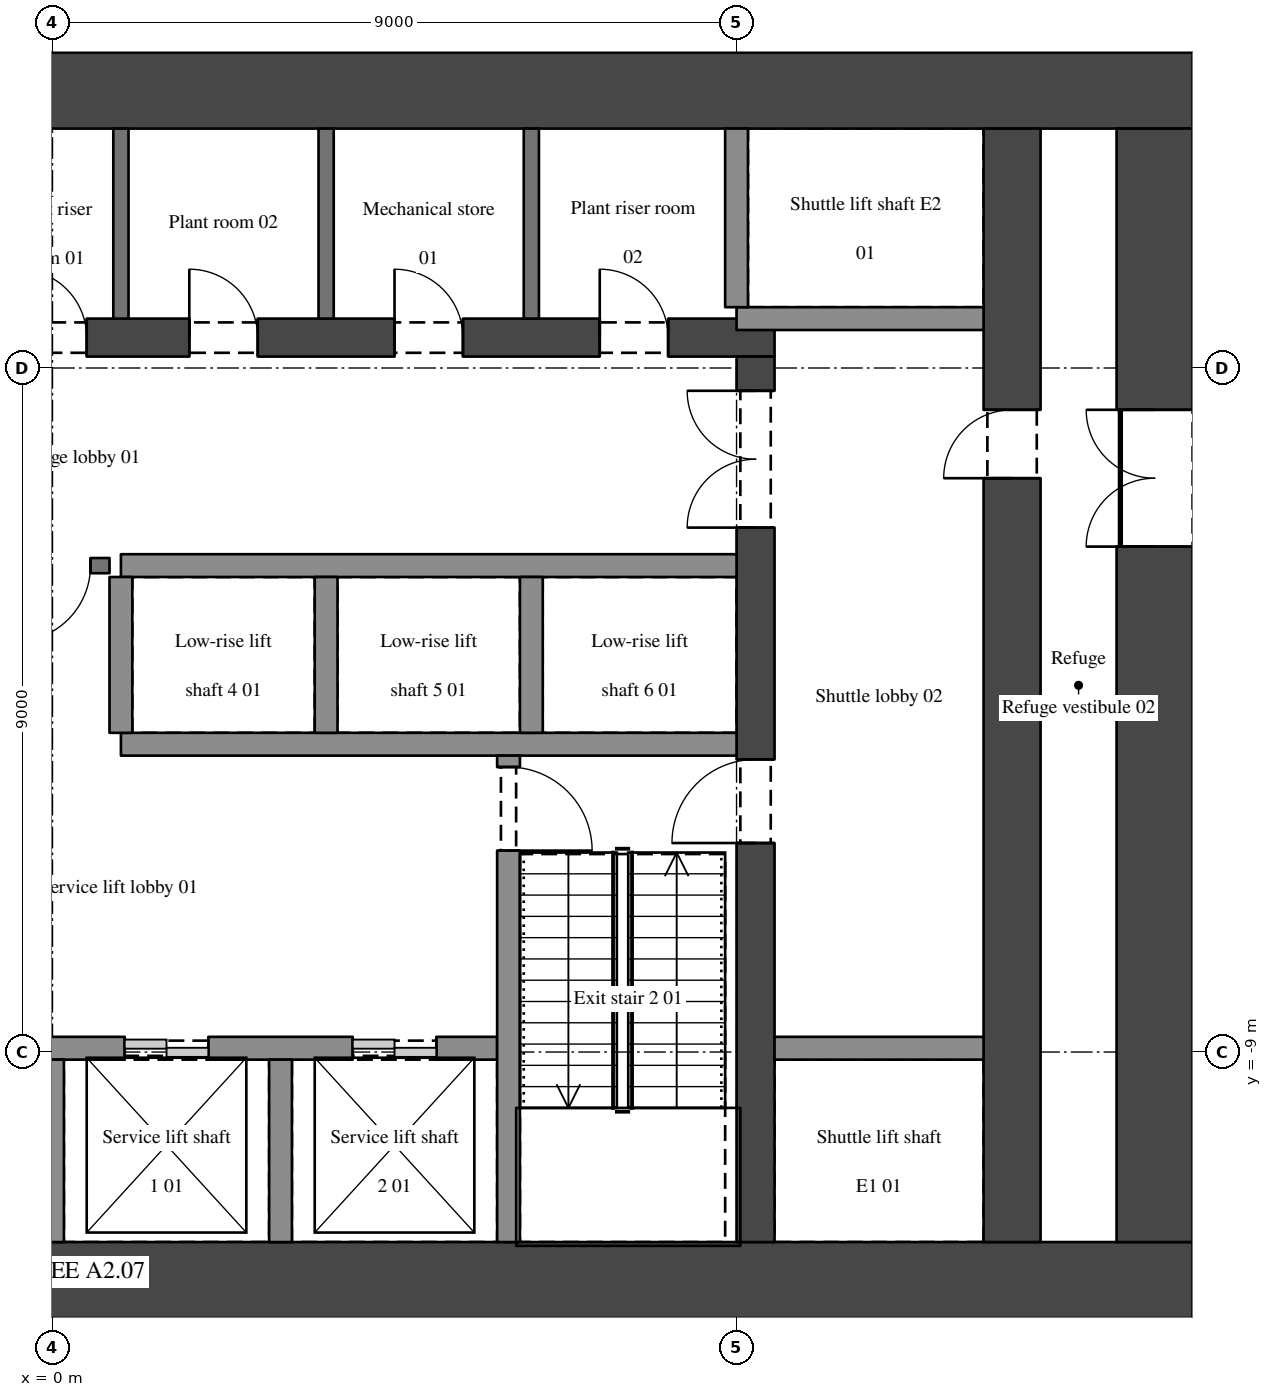
"""IFC4 building model, lengths in metres.
Left out: names, types, materials, properties, quantities, classifications, styles, units other than length and angle.
Written with IfcOpenShell. Run it as: python <this file> out.ifc"""

import sys

from ifc_helpers import new_model, si_unit, direction, frame, frame_2d, origin, place, context, subcontext, project, spatial, rectangle, extrude, element, fill, save


model = new_model("IFC4")
c1 = context("Model", 3, precision=1e-05, world=origin(), true_north=direction((0.0, 1.0)))
c2 = subcontext(c1, "Body", "Model", "MODEL_VIEW")
j1 = project(units=[si_unit("LENGTHUNIT", "METRE"), si_unit("PLANEANGLEUNIT", "RADIAN")], contexts=[c1])
p1 = place(None, origin())
s1 = spatial("IfcSite", under=j1, at=p1, CompositionType="ELEMENT")
p2 = place(p1, origin())
s2 = spatial("IfcBuilding", under=s1, at=p2, CompositionType="ELEMENT")
p3 = place(p2, frame((0.0, 0.0, 57.6)))
s3 = spatial("IfcBuildingStorey", under=s2, at=p3, CompositionType="ELEMENT", Elevation=57.6)
for number, where, z_axis, x_axis in (
    (1, (-15.0, -12.0, 0.0), (0.0, 0.0, 1.0), (1.0, 0.0, 0.0)),
    (2, (-15.0, 3.65, 0.0), (0.0, 0.0, 1.0), (1.0, 0.0, 0.0)),
):
    element("IfcWall", number, at=place(p3, frame(where, z_axis=z_axis, x_axis=x_axis)), inside=s3, PredefinedType="SHEAR", context=c2, shape_type="SweptSolid", body=[
        extrude(rectangle(XDim=30.0, YDim=1.0, at=frame_2d((15.0, 0.0))), origin(), (0.0, 0.0, 1.0), 4.5),
    ])
p4 = place(p3, frame((14.5, -11.5, 0.0), z_axis=(0.0, 0.0, 1.0), x_axis=(0.0, 1.0, 0.0)))
e3 = element("IfcWall", 3, at=p4, inside=s3, PredefinedType="SHEAR", context=c2, shape_type="SweptSolid", body=[
    extrude(rectangle(XDim=14.65, YDim=1.0, at=frame_2d((7.325, 0.0))), origin(), (0.0, 0.0, 1.0), 4.5),
])
p5 = place(p4, frame((9.15, 0.0, 0.0)))
e4 = element("IfcOpeningElement", 4, at=p5, cuts=e3, PredefinedType="OPENING", context=c2, shape_type="SweptSolid", body=[
    extrude(rectangle(XDim=1.8, YDim=2.1, at=frame_2d((0.9, 1.05))), frame((0.0, 0.51, 0.0), z_axis=(0.0, -1.0, 0.0), x_axis=(1.0, 0.0, 0.0)), (0.0, 0.0, 1.0), 1.02),
])
p6 = place(p3, frame((12.625, -11.5, 0.0), z_axis=(0.0, 0.0, 1.0), x_axis=(0.0, 1.0, 0.0)))
e5 = element("IfcWall", 5, at=p6, inside=s3, PredefinedType="SHEAR", context=c2, shape_type="SweptSolid", body=[
    extrude(rectangle(XDim=14.65, YDim=0.75, at=frame_2d((7.325, 0.0))), origin(), (0.0, 0.0, 1.0), 4.5),
])
p7 = place(p6, frame((10.05, 0.0, 0.0)))
e6 = element("IfcOpeningElement", 6, at=p7, cuts=e5, PredefinedType="OPENING", context=c2, shape_type="SweptSolid", body=[
    extrude(rectangle(XDim=0.9, YDim=2.1, at=frame_2d((0.45, 1.05))), frame((0.0, 0.385, 0.0), z_axis=(0.0, -1.0, 0.0), x_axis=(1.0, 0.0, 0.0)), (0.0, 0.0, 1.0), 0.77),
])
p8 = place(p3, frame((-9.5, 0.4, 0.0), z_axis=(0.0, 0.0, 1.0), x_axis=(1.0, 0.0, 0.0)))
e7 = element("IfcWall", 7, at=p8, inside=s3, PredefinedType="SHEAR", context=c2, shape_type="SweptSolid", body=[
    extrude(rectangle(XDim=19.0, YDim=0.5, at=frame_2d((9.5, 0.0))), origin(), (0.0, 0.0, 1.0), 4.5),
])
p9 = place(p8, frame((1.4, 0.0, 0.0)))
e8 = element("IfcOpeningElement", 8, at=p9, cuts=e7, PredefinedType="OPENING", context=c2, shape_type="SweptSolid", body=[
    extrude(rectangle(XDim=0.9, YDim=2.1, at=frame_2d((0.45, 1.05))), frame((0.0, 0.26, 0.0), z_axis=(0.0, -1.0, 0.0), x_axis=(1.0, 0.0, 0.0)), (0.0, 0.0, 1.0), 0.52),
])
p10 = place(p8, frame((4.1, 0.0, 0.0)))
e9 = element("IfcOpeningElement", 9, at=p10, cuts=e7, PredefinedType="OPENING", context=c2, shape_type="SweptSolid", body=[
    extrude(rectangle(XDim=0.9, YDim=2.1, at=frame_2d((0.45, 1.05))), frame((0.0, 0.26, 0.0), z_axis=(0.0, -1.0, 0.0), x_axis=(1.0, 0.0, 0.0)), (0.0, 0.0, 1.0), 0.52),
])
p11 = place(p8, frame((6.8, 0.0, 0.0)))
e10 = element("IfcOpeningElement", 10, at=p11, cuts=e7, PredefinedType="OPENING", context=c2, shape_type="SweptSolid", body=[
    extrude(rectangle(XDim=0.9, YDim=2.1, at=frame_2d((0.45, 1.05))), frame((0.0, 0.26, 0.0), z_axis=(0.0, -1.0, 0.0), x_axis=(1.0, 0.0, 0.0)), (0.0, 0.0, 1.0), 0.52),
])
p12 = place(p8, frame((11.3, 0.0, 0.0)))
e11 = element("IfcOpeningElement", 11, at=p12, cuts=e7, PredefinedType="OPENING", context=c2, shape_type="SweptSolid", body=[
    extrude(rectangle(XDim=0.9, YDim=2.1, at=frame_2d((0.45, 1.05))), frame((0.0, 0.26, 0.0), z_axis=(0.0, -1.0, 0.0), x_axis=(1.0, 0.0, 0.0)), (0.0, 0.0, 1.0), 0.52),
])
p13 = place(p8, frame((14.0, 0.0, 0.0)))
e12 = element("IfcOpeningElement", 12, at=p13, cuts=e7, PredefinedType="OPENING", context=c2, shape_type="SweptSolid", body=[
    extrude(rectangle(XDim=0.9, YDim=2.1, at=frame_2d((0.45, 1.05))), frame((0.0, 0.26, 0.0), z_axis=(0.0, -1.0, 0.0), x_axis=(1.0, 0.0, 0.0)), (0.0, 0.0, 1.0), 0.52),
])
p14 = place(p8, frame((16.7, 0.0, 0.0)))
e13 = element("IfcOpeningElement", 13, at=p14, cuts=e7, PredefinedType="OPENING", context=c2, shape_type="SweptSolid", body=[
    extrude(rectangle(XDim=0.9, YDim=2.1, at=frame_2d((0.45, 1.05))), frame((0.0, 0.26, 0.0), z_axis=(0.0, -1.0, 0.0), x_axis=(1.0, 0.0, 0.0)), (0.0, 0.0, 1.0), 0.52),
])
p15 = place(p8, frame((9.05, 0.0, 0.0)))
e14 = element("IfcOpeningElement", 14, at=p15, cuts=e7, PredefinedType="OPENING", context=c2, shape_type="SweptSolid", body=[
    extrude(rectangle(XDim=0.9, YDim=2.1, at=frame_2d((0.45, 1.05))), frame((0.0, 0.26, 0.0), z_axis=(0.0, -1.0, 0.0), x_axis=(1.0, 0.0, 0.0)), (0.0, 0.0, 1.0), 0.52),
])
p16 = place(p3, frame((9.25, -11.5, 0.0), z_axis=(0.0, 0.0, 1.0), x_axis=(0.0, 1.0, 0.0)))
e15 = element("IfcWall", 15, at=p16, inside=s3, PredefinedType="SHEAR", context=c2, shape_type="SweptSolid", body=[
    extrude(rectangle(XDim=11.65, YDim=0.5, at=frame_2d((5.825, 0.0))), origin(), (0.0, 0.0, 1.0), 4.5),
])
p17 = place(p16, frame((9.4, 0.0, 0.0)))
e16 = element("IfcOpeningElement", 16, at=p17, cuts=e15, PredefinedType="OPENING", context=c2, shape_type="SweptSolid", body=[
    extrude(rectangle(XDim=1.8, YDim=2.1, at=frame_2d((0.9, 1.05))), frame((0.0, 0.26, 0.0), z_axis=(0.0, -1.0, 0.0), x_axis=(1.0, 0.0, 0.0)), (0.0, 0.0, 1.0), 0.52),
])
p18 = place(p16, frame((5.25, 0.0, 0.0)))
e17 = element("IfcOpeningElement", 17, at=p18, cuts=e15, PredefinedType="OPENING", context=c2, shape_type="SweptSolid", body=[
    extrude(rectangle(XDim=1.1, YDim=2.1, at=frame_2d((0.55, 1.05))), frame((0.0, 0.26, 0.0), z_axis=(0.0, -1.0, 0.0), x_axis=(1.0, 0.0, 0.0)), (0.0, 0.0, 1.0), 0.52),
])
p19 = place(p3, frame((-5.85, -8.95, 0.0), z_axis=(0.0, 0.0, 1.0), x_axis=(1.0, 0.0, 0.0)))
e18 = element("IfcWall", 18, at=p19, inside=s3, PredefinedType="SHEAR", context=c2, shape_type="SweptSolid", body=[
    extrude(rectangle(XDim=11.7, YDim=0.3, at=frame_2d((5.85, 0.0))), origin(), (0.0, 0.0, 1.0), 4.5),
])
p20 = place(p19, frame((0.8, 0.0, 0.0)))
e19 = element("IfcOpeningElement", 19, at=p20, cuts=e18, PredefinedType="OPENING", context=c2, shape_type="SweptSolid", body=[
    extrude(rectangle(XDim=1.1, YDim=2.1, at=frame_2d((0.55, 1.05))), frame((0.0, 0.16, 0.0), z_axis=(0.0, -1.0, 0.0), x_axis=(1.0, 0.0, 0.0)), (0.0, 0.0, 1.0), 0.32),
])
p21 = place(p19, frame((3.8, 0.0, 0.0)))
e20 = element("IfcOpeningElement", 20, at=p21, cuts=e18, PredefinedType="OPENING", context=c2, shape_type="SweptSolid", body=[
    extrude(rectangle(XDim=1.1, YDim=2.1, at=frame_2d((0.55, 1.05))), frame((0.0, 0.16, 0.0), z_axis=(0.0, -1.0, 0.0), x_axis=(1.0, 0.0, 0.0)), (0.0, 0.0, 1.0), 0.32),
])
p22 = place(p19, frame((6.8, 0.0, 0.0)))
e21 = element("IfcOpeningElement", 21, at=p22, cuts=e18, PredefinedType="OPENING", context=c2, shape_type="SweptSolid", body=[
    extrude(rectangle(XDim=1.1, YDim=2.1, at=frame_2d((0.55, 1.05))), frame((0.0, 0.16, 0.0), z_axis=(0.0, -1.0, 0.0), x_axis=(1.0, 0.0, 0.0)), (0.0, 0.0, 1.0), 0.32),
])
p23 = place(p19, frame((9.8, 0.0, 0.0)))
e22 = element("IfcOpeningElement", 22, at=p23, cuts=e18, PredefinedType="OPENING", context=c2, shape_type="SweptSolid", body=[
    extrude(rectangle(XDim=1.1, YDim=2.1, at=frame_2d((0.55, 1.05))), frame((0.0, 0.16, 0.0), z_axis=(0.0, -1.0, 0.0), x_axis=(1.0, 0.0, 0.0)), (0.0, 0.0, 1.0), 0.32),
])
p24 = place(p3, frame((9.5, -8.95, 0.0), z_axis=(0.0, 0.0, 1.0), x_axis=(1.0, 0.0, 0.0)))
e23 = element("IfcWall", 23, at=p24, inside=s3, PredefinedType="SHEAR", context=c2, shape_type="SweptSolid", body=[
    extrude(rectangle(XDim=2.75, YDim=0.3, at=frame_2d((1.375, 0.0))), origin(), (0.0, 0.0, 1.0), 4.5),
])
p25 = place(p3, frame((0.9, -4.95, 0.0), z_axis=(0.0, 0.0, 1.0), x_axis=(1.0, 0.0, 0.0)))
e24 = element("IfcWall", 24, at=p25, inside=s3, PredefinedType="SHEAR", context=c2, shape_type="SweptSolid", body=[
    extrude(rectangle(XDim=8.1, YDim=0.3, at=frame_2d((4.05, 0.0))), origin(), (0.0, 0.0, 1.0), 4.5),
])
p26 = place(p3, frame((0.75, -2.6, 0.0), z_axis=(0.0, 0.0, 1.0), x_axis=(-1.0, 0.0, 0.0)))
e25 = element("IfcWall", 25, at=p26, inside=s3, PredefinedType="SOLIDWALL", context=c2, shape_type="SweptSolid", body=[
    extrude(rectangle(XDim=1.5, YDim=0.2, at=frame_2d((0.75, 0.0))), origin(), (0.0, 0.0, 1.0), 4.2),
])
p27 = place(p26, frame((0.25, 0.0, 0.0)))
e26 = element("IfcOpeningElement", 26, at=p27, cuts=e25, PredefinedType="OPENING", context=c2, shape_type="SweptSolid", body=[
    extrude(rectangle(XDim=1.0, YDim=2.1, at=frame_2d((0.5, 1.05))), frame((0.0, 0.11, 0.0), z_axis=(0.0, -1.0, 0.0), x_axis=(1.0, 0.0, 0.0)), (0.0, 0.0, 1.0), 0.22),
])
p28 = place(p3, frame((0.9, -2.6, 0.0), z_axis=(0.0, 0.0, 1.0), x_axis=(1.0, 0.0, 0.0)))
e27 = element("IfcWall", 27, at=p28, inside=s3, PredefinedType="SHEAR", context=c2, shape_type="SweptSolid", body=[
    extrude(rectangle(XDim=8.1, YDim=0.3, at=frame_2d((4.05, 0.0))), origin(), (0.0, 0.0, 1.0), 4.5),
])
p29 = place(p3, frame((12.25, 0.65, 0.0), z_axis=(0.0, 0.0, 1.0), x_axis=(-1.0, 0.0, 0.0)))
e28 = element("IfcWall", 28, at=p29, inside=s3, PredefinedType="SHEAR", context=c2, shape_type="SweptSolid", body=[
    extrude(rectangle(XDim=3.25, YDim=0.3, at=frame_2d((1.625, 0.0))), origin(), (0.0, 0.0, 1.0), 4.5),
])
p30 = place(p3, frame((0.0, -11.5, 0.0), z_axis=(0.0, 0.0, 1.0), x_axis=(0.0, 1.0, 0.0)))
e29 = element("IfcWall", 29, at=p30, inside=s3, PredefinedType="SHEAR", context=c2, shape_type="SweptSolid", body=[
    extrude(rectangle(XDim=2.4, YDim=0.3, at=frame_2d((1.2, 0.0))), origin(), (0.0, 0.0, 1.0), 4.5),
])
p31 = place(p3, frame((0.9, -4.8, 0.0), z_axis=(0.0, 0.0, 1.0), x_axis=(0.0, 1.0, 0.0)))
e30 = element("IfcWall", 30, at=p31, inside=s3, PredefinedType="SHEAR", context=c2, shape_type="SweptSolid", body=[
    extrude(rectangle(XDim=2.05, YDim=0.3, at=frame_2d((1.025, 0.0))), origin(), (0.0, 0.0, 1.0), 4.5),
])
p32 = place(p3, frame((0.9, 0.65, 0.0), z_axis=(0.0, 0.0, 1.0), x_axis=(0.0, 1.0, 0.0)))
e31 = element("IfcWall", 31, at=p32, inside=s3, PredefinedType="SOLIDWALL", context=c2, shape_type="SweptSolid", body=[
    extrude(rectangle(XDim=2.5, YDim=0.2, at=frame_2d((1.25, 0.0))), origin(), (0.0, 0.0, 1.0), 4.2),
])
p33 = place(p3, frame((3.0, -11.5, 0.0), z_axis=(0.0, 0.0, 1.0), x_axis=(0.0, 1.0, 0.0)))
e32 = element("IfcWall", 32, at=p33, inside=s3, PredefinedType="SHEAR", context=c2, shape_type="SweptSolid", body=[
    extrude(rectangle(XDim=2.4, YDim=0.3, at=frame_2d((1.2, 0.0))), origin(), (0.0, 0.0, 1.0), 4.5),
])
p34 = place(p3, frame((3.6, -4.8, 0.0), z_axis=(0.0, 0.0, 1.0), x_axis=(0.0, 1.0, 0.0)))
e33 = element("IfcWall", 33, at=p34, inside=s3, PredefinedType="SHEAR", context=c2, shape_type="SweptSolid", body=[
    extrude(rectangle(XDim=2.05, YDim=0.3, at=frame_2d((1.025, 0.0))), origin(), (0.0, 0.0, 1.0), 4.5),
])
p35 = place(p3, frame((3.6, 0.65, 0.0), z_axis=(0.0, 0.0, 1.0), x_axis=(0.0, 1.0, 0.0)))
e34 = element("IfcWall", 34, at=p35, inside=s3, PredefinedType="SOLIDWALL", context=c2, shape_type="SweptSolid", body=[
    extrude(rectangle(XDim=2.5, YDim=0.2, at=frame_2d((1.25, 0.0))), origin(), (0.0, 0.0, 1.0), 4.2),
])
p36 = place(p3, frame((6.0, -5.1, 0.0), z_axis=(0.0, 0.0, 1.0), x_axis=(0.0, -1.0, 0.0)))
e35 = element("IfcWall", 35, at=p36, inside=s3, PredefinedType="SHEAR", context=c2, shape_type="SweptSolid", body=[
    extrude(rectangle(XDim=6.4, YDim=0.3, at=frame_2d((3.2, 0.0))), origin(), (0.0, 0.0, 1.0), 4.5),
])
p37 = place(p36, frame((0.15, 0.0, 0.0)))
e36 = element("IfcOpeningElement", 36, at=p37, cuts=e35, PredefinedType="OPENING", context=c2, shape_type="SweptSolid", body=[
    extrude(rectangle(XDim=1.1, YDim=2.1, at=frame_2d((0.55, 1.05))), frame((0.0, 0.16, 0.0), z_axis=(0.0, -1.0, 0.0), x_axis=(1.0, 0.0, 0.0)), (0.0, 0.0, 1.0), 0.32),
])
p38 = place(p3, frame((6.3, -4.8, 0.0), z_axis=(0.0, 0.0, 1.0), x_axis=(0.0, 1.0, 0.0)))
e37 = element("IfcWall", 37, at=p38, inside=s3, PredefinedType="SHEAR", context=c2, shape_type="SweptSolid", body=[
    extrude(rectangle(XDim=2.05, YDim=0.3, at=frame_2d((1.025, 0.0))), origin(), (0.0, 0.0, 1.0), 4.5),
])
p39 = place(p3, frame((6.3, 0.65, 0.0), z_axis=(0.0, 0.0, 1.0), x_axis=(0.0, 1.0, 0.0)))
e38 = element("IfcWall", 38, at=p39, inside=s3, PredefinedType="SOLIDWALL", context=c2, shape_type="SweptSolid", body=[
    extrude(rectangle(XDim=2.5, YDim=0.2, at=frame_2d((1.25, 0.0))), origin(), (0.0, 0.0, 1.0), 4.2),
])
p40 = place(p3, frame((9.0, 0.8, 0.0), z_axis=(0.0, 0.0, 1.0), x_axis=(0.0, 1.0, 0.0)))
e39 = element("IfcWall", 39, at=p40, inside=s3, PredefinedType="SHEAR", context=c2, shape_type="SweptSolid", body=[
    extrude(rectangle(XDim=2.35, YDim=0.3, at=frame_2d((1.175, 0.0))), origin(), (0.0, 0.0, 1.0), 4.5),
])
p41 = place(p17, origin())
e40 = element("IfcDoor", 40, at=p41, inside=s3, OperationType="DOUBLE_DOOR_SINGLE_SWING", PredefinedType="DOOR", context=c2, shape_type="SweptSolid", body=[
    extrude(rectangle(XDim=1.8, YDim=2.1, at=frame_2d((0.9, 1.05))), frame((0.0, 0.025, 0.0), z_axis=(0.0, -1.0, 0.0), x_axis=(1.0, 0.0, 0.0)), (0.0, 0.0, 1.0), 0.05),
])
fill(e16, e40)
p42 = place(p27, origin())
e41 = element("IfcDoor", 41, at=p42, inside=s3, OperationType="SINGLE_SWING_RIGHT", PredefinedType="DOOR", context=c2, shape_type="SweptSolid", body=[
    extrude(rectangle(XDim=1.0, YDim=2.1, at=frame_2d((0.5, 1.05))), frame((0.0, 0.025, 0.0), z_axis=(0.0, -1.0, 0.0), x_axis=(1.0, 0.0, 0.0)), (0.0, 0.0, 1.0), 0.05),
])
fill(e26, e41)
p43 = place(p37, origin())
e42 = element("IfcDoor", 42, at=p43, inside=s3, OperationType="SINGLE_SWING_RIGHT", PredefinedType="DOOR", context=c2, shape_type="SweptSolid", body=[
    extrude(rectangle(XDim=1.1, YDim=2.1, at=frame_2d((0.55, 1.05))), frame((0.0, 0.025, 0.0), z_axis=(0.0, -1.0, 0.0), x_axis=(1.0, 0.0, 0.0)), (0.0, 0.0, 1.0), 0.05),
])
fill(e36, e42)
p44 = place(p18, origin())
e43 = element("IfcDoor", 43, at=p44, inside=s3, OperationType="SINGLE_SWING_LEFT", PredefinedType="DOOR", context=c2, shape_type="SweptSolid", body=[
    extrude(rectangle(XDim=1.1, YDim=2.1, at=frame_2d((0.55, 1.05))), frame((0.0, 0.025, 0.0), z_axis=(0.0, -1.0, 0.0), x_axis=(1.0, 0.0, 0.0)), (0.0, 0.0, 1.0), 0.05),
])
fill(e17, e43)
p45 = place(p12, origin())
e44 = element("IfcDoor", 44, at=p45, inside=s3, OperationType="SINGLE_SWING_LEFT", PredefinedType="DOOR", context=c2, shape_type="SweptSolid", body=[
    extrude(rectangle(XDim=0.9, YDim=2.1, at=frame_2d((0.45, 1.05))), frame((0.0, 0.025, 0.0), z_axis=(0.0, -1.0, 0.0), x_axis=(1.0, 0.0, 0.0)), (0.0, 0.0, 1.0), 0.05),
])
fill(e11, e44)
p46 = place(p13, origin())
e45 = element("IfcDoor", 45, at=p46, inside=s3, OperationType="SINGLE_SWING_LEFT", PredefinedType="DOOR", context=c2, shape_type="SweptSolid", body=[
    extrude(rectangle(XDim=0.9, YDim=2.1, at=frame_2d((0.45, 1.05))), frame((0.0, 0.025, 0.0), z_axis=(0.0, -1.0, 0.0), x_axis=(1.0, 0.0, 0.0)), (0.0, 0.0, 1.0), 0.05),
])
fill(e12, e45)
p47 = place(p14, origin())
e46 = element("IfcDoor", 46, at=p47, inside=s3, OperationType="SINGLE_SWING_LEFT", PredefinedType="DOOR", context=c2, shape_type="SweptSolid", body=[
    extrude(rectangle(XDim=0.9, YDim=2.1, at=frame_2d((0.45, 1.05))), frame((0.0, 0.025, 0.0), z_axis=(0.0, -1.0, 0.0), x_axis=(1.0, 0.0, 0.0)), (0.0, 0.0, 1.0), 0.05),
])
fill(e13, e46)
p48 = place(p15, origin())
e47 = element("IfcDoor", 47, at=p48, inside=s3, OperationType="SINGLE_SWING_LEFT", PredefinedType="DOOR", context=c2, shape_type="SweptSolid", body=[
    extrude(rectangle(XDim=0.9, YDim=2.1, at=frame_2d((0.45, 1.05))), frame((0.0, 0.025, 0.0), z_axis=(0.0, -1.0, 0.0), x_axis=(1.0, 0.0, 0.0)), (0.0, 0.0, 1.0), 0.05),
])
fill(e14, e47)
p49 = place(p7, origin())
e48 = element("IfcDoor", 48, at=p49, inside=s3, OperationType="SINGLE_SWING_LEFT", PredefinedType="DOOR", context=c2, shape_type="SweptSolid", body=[
    extrude(rectangle(XDim=0.9, YDim=2.1, at=frame_2d((0.45, 1.05))), frame((0.0, 0.025, 0.0), z_axis=(0.0, -1.0, 0.0), x_axis=(1.0, 0.0, 0.0)), (0.0, 0.0, 1.0), 0.05),
])
fill(e6, e48)
p50 = place(p22, origin())
e49 = element("IfcDoor", 49, at=p50, inside=s3, OperationType="DOUBLE_DOOR_SLIDING", PredefinedType="DOOR", context=c2, shape_type="SweptSolid", body=[
    extrude(rectangle(XDim=1.1, YDim=2.1, at=frame_2d((0.55, 1.05))), frame((0.0, 0.025, 0.0), z_axis=(0.0, -1.0, 0.0), x_axis=(1.0, 0.0, 0.0)), (0.0, 0.0, 1.0), 0.05),
])
fill(e21, e49)
p51 = place(p23, origin())
e50 = element("IfcDoor", 50, at=p51, inside=s3, OperationType="DOUBLE_DOOR_SLIDING", PredefinedType="DOOR", context=c2, shape_type="SweptSolid", body=[
    extrude(rectangle(XDim=1.1, YDim=2.1, at=frame_2d((0.55, 1.05))), frame((0.0, 0.025, 0.0), z_axis=(0.0, -1.0, 0.0), x_axis=(1.0, 0.0, 0.0)), (0.0, 0.0, 1.0), 0.05),
])
fill(e22, e50)
p52 = place(p5, origin())
e51 = element("IfcDoor", 51, at=p52, inside=s3, OperationType="DOUBLE_DOOR_SINGLE_SWING", PredefinedType="DOOR", context=c2, shape_type="SweptSolid", body=[
    extrude(rectangle(XDim=1.8, YDim=2.1, at=frame_2d((0.9, 1.05))), frame((0.0, 0.025, 0.0), z_axis=(0.0, -1.0, 0.0), x_axis=(1.0, 0.0, 0.0)), (0.0, 0.0, 1.0), 0.05),
])
fill(e4, e51)
save(model, sys.argv[1])
